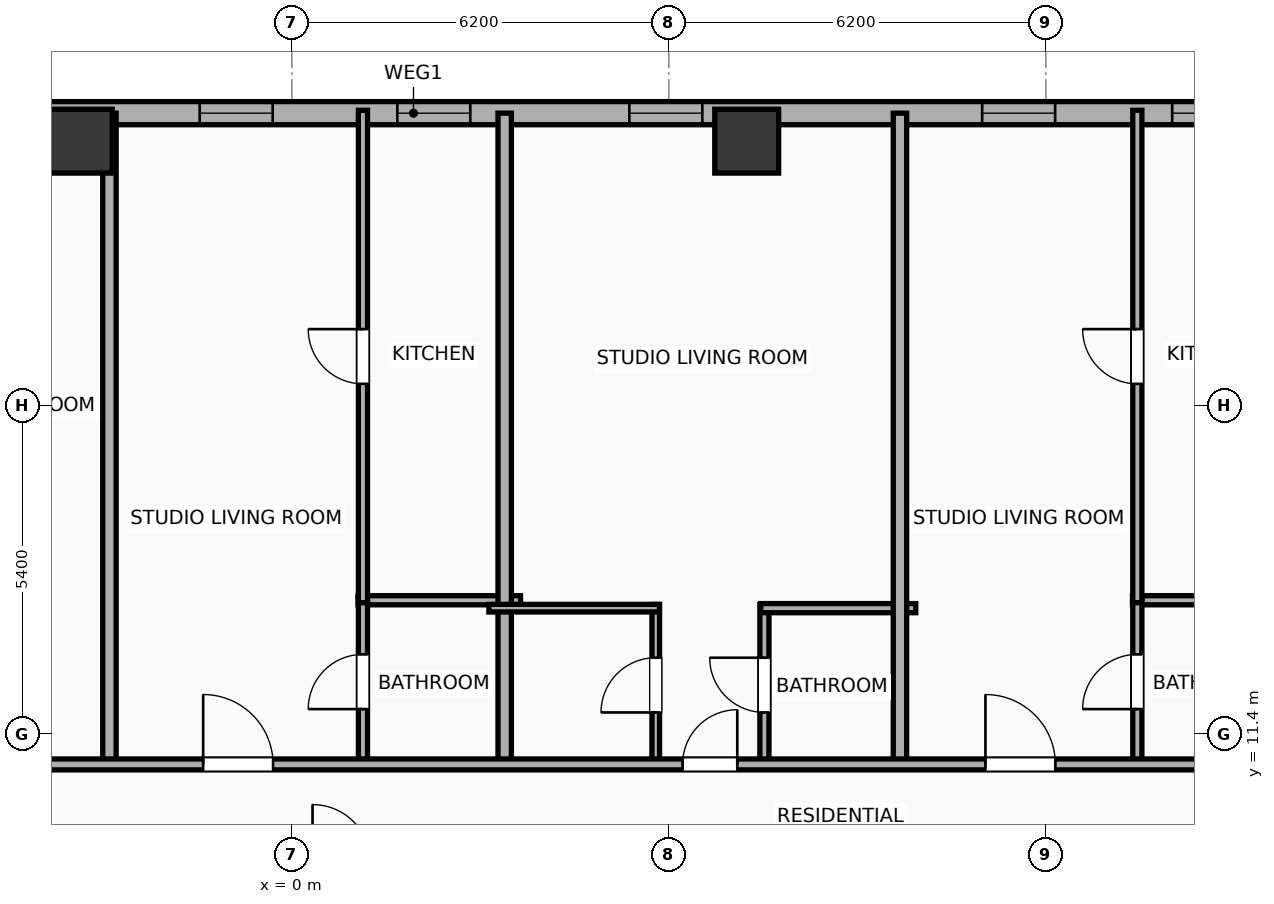
"""IFC4 building model, lengths in metres.
Left out: names, types, materials, properties, quantities, classifications, styles, units other than length and angle.
Written with IfcOpenShell. Run it as: python <this file> out.ifc"""

import sys

from ifc_helpers import new_model, si_unit, direction, frame, frame_2d, origin, origin_2d, place, context, subcontext, project, spatial, rectangle, hollow_rectangle, extrude, element, fill, save


model = new_model("IFC4")
c1 = context("Model", 3, precision=1e-05, world=origin(), true_north=direction((0.0, 1.0)))
c2 = subcontext(c1, "Body", "Model", "MODEL_VIEW")
j1 = project(units=[si_unit("LENGTHUNIT", "METRE"), si_unit("PLANEANGLEUNIT", "RADIAN")], contexts=[c1])
p1 = place(None, origin())
s1 = spatial("IfcSite", under=j1, at=p1, CompositionType="ELEMENT")
p2 = place(p1, origin())
s2 = spatial("IfcBuilding", under=s1, at=p2, CompositionType="ELEMENT")
p3 = place(p2, frame((0.0, 0.0, 89.7)))
s3 = spatial("IfcBuildingStorey", under=s2, at=p3, CompositionType="ELEMENT", Elevation=89.7)
for number, where, z_axis, x_axis in (
    (1, (7.48, 21.15, 0.0), (0.0, 0.0, 1.0), (1.0, 0.0, 0.0)),
    (2, (-3.48, 21.15, 0.0), (0.0, 0.0, 1.0), (1.0, 0.0, 0.0)),
):
    element("IfcColumn", number, at=place(p3, frame(where, z_axis=z_axis, x_axis=x_axis)), inside=s3, PredefinedType="COLUMN", context=c2, shape_type="SweptSolid", body=[
        extrude(hollow_rectangle(XDim=1.05, YDim=1.05, WallThickness=0.036, at=origin_2d()), origin(), (0.0, 0.0, 1.0), 3.9),
    ])
p4 = place(p3, frame((-25.381, 21.61, 0.0), z_axis=(0.0, 0.0, 1.0), x_axis=(1.0, 0.0, 0.0)))
e3 = element("IfcWall", 3, at=p4, inside=s3, PredefinedType="ELEMENTEDWALL", context=c2, shape_type="SweptSolid", body=[
    extrude(rectangle(XDim=54.763, YDim=0.38, at=frame_2d((27.381, 0.0))), origin(), (0.0, 0.0, 1.0), 2.54),
])
p5 = place(p4, frame((6.495, 0.0, 0.75)))
e4 = element("IfcOpeningElement", 4, at=p5, cuts=e3, PredefinedType="OPENING", context=c2, shape_type="SweptSolid", body=[
    extrude(rectangle(XDim=2.4, YDim=1.63, at=frame_2d((1.2, 0.815))), frame((0.0, 0.2, 0.0), z_axis=(0.0, -1.0, 0.0), x_axis=(1.0, 0.0, 0.0)), (0.0, 0.0, 1.0), 0.4),
])
p6 = place(p4, frame((48.367, 0.0, 0.75)))
e5 = element("IfcOpeningElement", 5, at=p6, cuts=e3, PredefinedType="OPENING", context=c2, shape_type="SweptSolid", body=[
    extrude(rectangle(XDim=2.4, YDim=1.63, at=frame_2d((1.2, 0.815))), frame((0.0, 0.2, 0.0), z_axis=(0.0, -1.0, 0.0), x_axis=(1.0, 0.0, 0.0)), (0.0, 0.0, 1.0), 0.4),
])
p7 = place(p4, frame((1.231, 0.0, 0.75)))
e6 = element("IfcOpeningElement", 6, at=p7, cuts=e3, PredefinedType="OPENING", context=c2, shape_type="SweptSolid", body=[
    extrude(rectangle(XDim=1.2, YDim=1.63, at=frame_2d((0.6, 0.815))), frame((0.0, 0.2, 0.0), z_axis=(0.0, -1.0, 0.0), x_axis=(1.0, 0.0, 0.0)), (0.0, 0.0, 1.0), 0.4),
])
p8 = place(p4, frame((3.772, 0.0, 0.75)))
e7 = element("IfcOpeningElement", 7, at=p8, cuts=e3, PredefinedType="OPENING", context=c2, shape_type="SweptSolid", body=[
    extrude(rectangle(XDim=1.2, YDim=1.63, at=frame_2d((0.6, 0.815))), frame((0.0, 0.2, 0.0), z_axis=(0.0, -1.0, 0.0), x_axis=(1.0, 0.0, 0.0)), (0.0, 0.0, 1.0), 0.4),
])
p9 = place(p4, frame((12.031, 0.0, 0.75)))
e8 = element("IfcOpeningElement", 8, at=p9, cuts=e3, PredefinedType="OPENING", context=c2, shape_type="SweptSolid", body=[
    extrude(rectangle(XDim=1.2, YDim=1.63, at=frame_2d((0.6, 0.815))), frame((0.0, 0.2, 0.0), z_axis=(0.0, -1.0, 0.0), x_axis=(1.0, 0.0, 0.0)), (0.0, 0.0, 1.0), 0.4),
])
p10 = place(p4, frame((19.805, 0.0, 0.75)))
e9 = element("IfcOpeningElement", 9, at=p10, cuts=e3, PredefinedType="OPENING", context=c2, shape_type="SweptSolid", body=[
    extrude(rectangle(XDim=1.2, YDim=1.63, at=frame_2d((0.6, 0.815))), frame((0.0, 0.2, 0.0), z_axis=(0.0, -1.0, 0.0), x_axis=(1.0, 0.0, 0.0)), (0.0, 0.0, 1.0), 0.4),
])
p11 = place(p4, frame((16.555, 0.0, 0.75)))
e10 = element("IfcOpeningElement", 10, at=p11, cuts=e3, PredefinedType="OPENING", context=c2, shape_type="SweptSolid", body=[
    extrude(rectangle(XDim=1.2, YDim=1.63, at=frame_2d((0.6, 0.815))), frame((0.0, 0.2, 0.0), z_axis=(0.0, -1.0, 0.0), x_axis=(1.0, 0.0, 0.0)), (0.0, 0.0, 1.0), 0.4),
])
p12 = place(p4, frame((23.866, 0.0, 0.75)))
e11 = element("IfcOpeningElement", 11, at=p12, cuts=e3, PredefinedType="OPENING", context=c2, shape_type="SweptSolid", body=[
    extrude(rectangle(XDim=1.2, YDim=1.63, at=frame_2d((0.6, 0.815))), frame((0.0, 0.2, 0.0), z_axis=(0.0, -1.0, 0.0), x_axis=(1.0, 0.0, 0.0)), (0.0, 0.0, 1.0), 0.4),
])
p13 = place(p4, frame((27.116, 0.0, 0.75)))
e12 = element("IfcOpeningElement", 12, at=p13, cuts=e3, PredefinedType="OPENING", context=c2, shape_type="SweptSolid", body=[
    extrude(rectangle(XDim=1.2, YDim=1.63, at=frame_2d((0.6, 0.815))), frame((0.0, 0.2, 0.0), z_axis=(0.0, -1.0, 0.0), x_axis=(1.0, 0.0, 0.0)), (0.0, 0.0, 1.0), 0.4),
])
p14 = place(p4, frame((30.931, 0.0, 0.75)))
e13 = element("IfcOpeningElement", 13, at=p14, cuts=e3, PredefinedType="OPENING", context=c2, shape_type="SweptSolid", body=[
    extrude(rectangle(XDim=1.2, YDim=1.63, at=frame_2d((0.6, 0.815))), frame((0.0, 0.2, 0.0), z_axis=(0.0, -1.0, 0.0), x_axis=(1.0, 0.0, 0.0)), (0.0, 0.0, 1.0), 0.4),
])
p15 = place(p4, frame((36.733, 0.0, 0.75)))
e14 = element("IfcOpeningElement", 14, at=p15, cuts=e3, PredefinedType="OPENING", context=c2, shape_type="SweptSolid", body=[
    extrude(rectangle(XDim=1.2, YDim=1.63, at=frame_2d((0.6, 0.815))), frame((0.0, 0.2, 0.0), z_axis=(0.0, -1.0, 0.0), x_axis=(1.0, 0.0, 0.0)), (0.0, 0.0, 1.0), 0.4),
])
p16 = place(p4, frame((39.858, 0.0, 0.75)))
e15 = element("IfcOpeningElement", 15, at=p16, cuts=e3, PredefinedType="OPENING", context=c2, shape_type="SweptSolid", body=[
    extrude(rectangle(XDim=1.2, YDim=1.63, at=frame_2d((0.6, 0.815))), frame((0.0, 0.2, 0.0), z_axis=(0.0, -1.0, 0.0), x_axis=(1.0, 0.0, 0.0)), (0.0, 0.0, 1.0), 0.4),
])
p17 = place(p4, frame((44.636, 0.0, 0.75)))
e16 = element("IfcOpeningElement", 16, at=p17, cuts=e3, PredefinedType="OPENING", context=c2, shape_type="SweptSolid", body=[
    extrude(rectangle(XDim=1.2, YDim=1.63, at=frame_2d((0.6, 0.815))), frame((0.0, 0.2, 0.0), z_axis=(0.0, -1.0, 0.0), x_axis=(1.0, 0.0, 0.0)), (0.0, 0.0, 1.0), 0.4),
])
p18 = place(p4, frame((51.809, 0.0, 0.75)))
e17 = element("IfcOpeningElement", 17, at=p18, cuts=e3, PredefinedType="OPENING", context=c2, shape_type="SweptSolid", body=[
    extrude(rectangle(XDim=1.2, YDim=1.63, at=frame_2d((0.6, 0.815))), frame((0.0, 0.2, 0.0), z_axis=(0.0, -1.0, 0.0), x_axis=(1.0, 0.0, 0.0)), (0.0, 0.0, 1.0), 0.4),
])
p19 = place(p3, frame((-3.0, 10.82, 0.0), z_axis=(0.0, 0.0, 1.0), x_axis=(0.0, 1.0, 0.0)))
e18 = element("IfcWall", 18, at=p19, inside=s3, PredefinedType="PARTITIONING", context=c2, shape_type="SweptSolid", body=[
    extrude(rectangle(XDim=10.79, YDim=0.22, at=frame_2d((5.395, 0.0))), origin(), (0.0, 0.0, 1.0), 2.54),
])
p20 = place(p3, frame((1.089, 13.6, 0.0), z_axis=(0.0, 0.0, 1.0), x_axis=(1.0, 0.0, 0.0)))
e19 = element("IfcWall", 19, at=p20, inside=s3, PredefinedType="PLUMBINGWALL", context=c2, shape_type="SweptSolid", body=[
    extrude(rectangle(XDim=2.671, YDim=0.15, at=frame_2d((1.335, 0.0))), origin(), (0.0, 0.0, 1.0), 3.65),
])
p21 = place(p3, frame((1.169, 10.88, 0.0), z_axis=(0.0, 0.0, 1.0), x_axis=(0.0, 1.0, 0.0)))
e20 = element("IfcWall", 20, at=p21, inside=s3, PredefinedType="PLUMBINGWALL", context=c2, shape_type="SweptSolid", body=[
    extrude(rectangle(XDim=2.76, YDim=0.15, at=frame_2d((1.38, 0.0))), origin(), (0.0, 0.0, 1.0), 3.65),
])
p22 = place(p21, frame((0.93, 0.0, 0.0)))
e21 = element("IfcOpeningElement", 21, at=p22, cuts=e20, PredefinedType="OPENING", context=c2, shape_type="SweptSolid", body=[
    extrude(rectangle(XDim=0.9, YDim=2.05, at=frame_2d((0.45, 1.025))), frame((0.0, 0.085, 0.0), z_axis=(0.0, -1.0, 0.0), x_axis=(1.0, 0.0, 0.0)), (0.0, 0.0, 1.0), 0.17),
])
p23 = place(p3, frame((1.169, 13.56, 0.0), z_axis=(0.0, 0.0, 1.0), x_axis=(0.0, 1.0, 0.0)))
e22 = element("IfcWall", 22, at=p23, inside=s3, PredefinedType="PLUMBINGWALL", context=c2, shape_type="SweptSolid", body=[
    extrude(rectangle(XDim=8.098, YDim=0.15, at=frame_2d((4.049, 0.0))), origin(), (0.0, 0.0, 1.0), 3.65),
])
p24 = place(p23, frame((3.599, 0.0, 0.0)))
e23 = element("IfcOpeningElement", 23, at=p24, cuts=e22, PredefinedType="OPENING", context=c2, shape_type="SweptSolid", body=[
    extrude(rectangle(XDim=0.9, YDim=2.05, at=frame_2d((0.45, 1.025))), frame((0.0, 0.085, 0.0), z_axis=(0.0, -1.0, 0.0), x_axis=(1.0, 0.0, 0.0)), (0.0, 0.0, 1.0), 0.17),
])
p25 = place(p3, frame((3.5, 10.82, 0.0), z_axis=(0.0, 0.0, 1.0), x_axis=(0.0, 1.0, 0.0)))
e24 = element("IfcWall", 24, at=p25, inside=s3, PredefinedType="PARTITIONING", context=c2, shape_type="SweptSolid", body=[
    extrude(rectangle(XDim=10.79, YDim=0.22, at=frame_2d((5.395, 0.0))), origin(), (0.0, 0.0, 1.0), 3.65),
])
p26 = place(p3, frame((5.984, 10.88, 0.0), z_axis=(0.0, 0.0, 1.0), x_axis=(0.0, 1.0, 0.0)))
e25 = element("IfcWall", 25, at=p26, inside=s3, PredefinedType="PARTITIONING", context=c2, shape_type="SweptSolid", body=[
    extrude(rectangle(XDim=2.65, YDim=0.125, at=frame_2d((1.325, 0.0))), origin(), (0.0, 0.0, 1.0), 2.54),
])
p27 = place(p26, frame((0.875, 0.0, 0.0)))
e26 = element("IfcOpeningElement", 26, at=p27, cuts=e25, PredefinedType="OPENING", context=c2, shape_type="SweptSolid", body=[
    extrude(rectangle(XDim=0.9, YDim=2.05, at=frame_2d((0.45, 1.025))), frame((0.0, 0.073, 0.0), z_axis=(0.0, -1.0, 0.0), x_axis=(1.0, 0.0, 0.0)), (0.0, 0.0, 1.0), 0.145),
])
p28 = place(p3, frame((7.771, 10.88, 0.0), z_axis=(0.0, 0.0, 1.0), x_axis=(0.0, 1.0, 0.0)))
e27 = element("IfcWall", 27, at=p28, inside=s3, PredefinedType="PLUMBINGWALL", context=c2, shape_type="SweptSolid", body=[
    extrude(rectangle(XDim=2.65, YDim=0.15, at=frame_2d((1.325, 0.0))), origin(), (0.0, 0.0, 1.0), 3.65),
])
p29 = place(p28, frame((0.875, 0.0, 0.0)))
e28 = element("IfcOpeningElement", 28, at=p29, cuts=e27, PredefinedType="OPENING", context=c2, shape_type="SweptSolid", body=[
    extrude(rectangle(XDim=0.9, YDim=2.05, at=frame_2d((0.45, 1.025))), frame((0.0, 0.085, 0.0), z_axis=(0.0, -1.0, 0.0), x_axis=(1.0, 0.0, 0.0)), (0.0, 0.0, 1.0), 0.17),
])
p30 = place(p3, frame((3.24, 13.47, 0.0), z_axis=(0.0, 0.0, 1.0), x_axis=(1.0, 0.0, 0.0)))
e29 = element("IfcWall", 29, at=p30, inside=s3, PredefinedType="PARTITIONING", context=c2, shape_type="SweptSolid", body=[
    extrude(rectangle(XDim=2.804, YDim=0.125, at=frame_2d((1.402, 0.0))), origin(), (0.0, 0.0, 1.0), 3.65),
])
p31 = place(p3, frame((7.711, 13.47, 0.0), z_axis=(0.0, 0.0, 1.0), x_axis=(1.0, 0.0, 0.0)))
e30 = element("IfcWall", 30, at=p31, inside=s3, PredefinedType="PLUMBINGWALL", context=c2, shape_type="SweptSolid", body=[
    extrude(rectangle(XDim=2.549, YDim=0.15, at=frame_2d((1.274, 0.0))), origin(), (0.0, 0.0, 1.0), 3.65),
])
p32 = place(p3, frame((10.0, 10.82, 0.0), z_axis=(0.0, 0.0, 1.0), x_axis=(0.0, 1.0, 0.0)))
e31 = element("IfcWall", 31, at=p32, inside=s3, PredefinedType="PARTITIONING", context=c2, shape_type="SweptSolid", body=[
    extrude(rectangle(XDim=10.79, YDim=0.22, at=frame_2d((5.395, 0.0))), origin(), (0.0, 0.0, 1.0), 3.65),
])
p33 = place(p3, frame((13.824, 13.6, 0.0), z_axis=(0.0, 0.0, 1.0), x_axis=(1.0, 0.0, 0.0)))
e32 = element("IfcWall", 32, at=p33, inside=s3, PredefinedType="PLUMBINGWALL", context=c2, shape_type="SweptSolid", body=[
    extrude(rectangle(XDim=2.686, YDim=0.15, at=frame_2d((1.343, 0.0))), origin(), (0.0, 0.0, 1.0), 3.65),
])
p34 = place(p3, frame((13.904, 10.88, 0.0), z_axis=(0.0, 0.0, 1.0), x_axis=(0.0, 1.0, 0.0)))
e33 = element("IfcWall", 33, at=p34, inside=s3, PredefinedType="PLUMBINGWALL", context=c2, shape_type="SweptSolid", body=[
    extrude(rectangle(XDim=2.76, YDim=0.15, at=frame_2d((1.38, 0.0))), origin(), (0.0, 0.0, 1.0), 3.65),
])
p35 = place(p34, frame((0.93, 0.0, 0.0)))
e34 = element("IfcOpeningElement", 34, at=p35, cuts=e33, PredefinedType="OPENING", context=c2, shape_type="SweptSolid", body=[
    extrude(rectangle(XDim=0.9, YDim=2.05, at=frame_2d((0.45, 1.025))), frame((0.0, 0.085, 0.0), z_axis=(0.0, -1.0, 0.0), x_axis=(1.0, 0.0, 0.0)), (0.0, 0.0, 1.0), 0.17),
])
p36 = place(p3, frame((13.904, 13.56, 0.0), z_axis=(0.0, 0.0, 1.0), x_axis=(0.0, 1.0, 0.0)))
e35 = element("IfcWall", 35, at=p36, inside=s3, PredefinedType="PLUMBINGWALL", context=c2, shape_type="SweptSolid", body=[
    extrude(rectangle(XDim=8.098, YDim=0.15, at=frame_2d((4.049, 0.0))), origin(), (0.0, 0.0, 1.0), 3.65),
])
p37 = place(p36, frame((3.599, 0.0, 0.0)))
e36 = element("IfcOpeningElement", 36, at=p37, cuts=e35, PredefinedType="OPENING", context=c2, shape_type="SweptSolid", body=[
    extrude(rectangle(XDim=0.9, YDim=2.05, at=frame_2d((0.45, 1.025))), frame((0.0, 0.085, 0.0), z_axis=(0.0, -1.0, 0.0), x_axis=(1.0, 0.0, 0.0)), (0.0, 0.0, 1.0), 0.17),
])
p38 = place(p3, frame((-29.21, 10.9, 0.0), z_axis=(0.0, 0.0, 1.0), x_axis=(1.0, 0.0, 0.0)))
e37 = element("IfcWall", 37, at=p38, inside=s3, PredefinedType="PARTITIONING", context=c2, shape_type="SweptSolid", body=[
    extrude(rectangle(XDim=62.42, YDim=0.18, at=frame_2d((31.21, 0.0))), origin(), (0.0, 0.0, 1.0), 3.65),
])
p39 = place(p38, frame((2.983, 0.0, 0.0)))
e38 = element("IfcOpeningElement", 38, at=p39, cuts=e37, PredefinedType="OPENING", context=c2, shape_type="SweptSolid", body=[
    extrude(rectangle(XDim=0.9, YDim=2.05, at=frame_2d((0.45, 1.025))), frame((0.0, 0.1, 0.0), z_axis=(0.0, -1.0, 0.0), x_axis=(1.0, 0.0, 0.0)), (0.0, 0.0, 1.0), 0.2),
])
p40 = place(p38, frame((9.618, 0.0, 0.0)))
e39 = element("IfcOpeningElement", 39, at=p40, cuts=e37, PredefinedType="OPENING", context=c2, shape_type="SweptSolid", body=[
    extrude(rectangle(XDim=0.9, YDim=2.05, at=frame_2d((0.45, 1.025))), frame((0.0, 0.1, 0.0), z_axis=(0.0, -1.0, 0.0), x_axis=(1.0, 0.0, 0.0)), (0.0, 0.0, 1.0), 0.2),
])
p41 = place(p38, frame((16.135, 0.0, 0.0)))
e40 = element("IfcOpeningElement", 40, at=p41, cuts=e37, PredefinedType="OPENING", context=c2, shape_type="SweptSolid", body=[
    extrude(rectangle(XDim=0.9, YDim=2.05, at=frame_2d((0.45, 1.025))), frame((0.0, 0.1, 0.0), z_axis=(0.0, -1.0, 0.0), x_axis=(1.0, 0.0, 0.0)), (0.0, 0.0, 1.0), 0.2),
])
p42 = place(p38, frame((23.632, 0.0, 0.0)))
e41 = element("IfcOpeningElement", 41, at=p42, cuts=e37, PredefinedType="OPENING", context=c2, shape_type="SweptSolid", body=[
    extrude(rectangle(XDim=1.15, YDim=2.05, at=frame_2d((0.575, 1.025))), frame((0.0, 0.1, 0.0), z_axis=(0.0, -1.0, 0.0), x_axis=(1.0, 0.0, 0.0)), (0.0, 0.0, 1.0), 0.2),
])
p43 = place(p38, frame((27.751, 0.0, 0.0)))
e42 = element("IfcOpeningElement", 42, at=p43, cuts=e37, PredefinedType="OPENING", context=c2, shape_type="SweptSolid", body=[
    extrude(rectangle(XDim=1.15, YDim=2.05, at=frame_2d((0.575, 1.025))), frame((0.0, 0.1, 0.0), z_axis=(0.0, -1.0, 0.0), x_axis=(1.0, 0.0, 0.0)), (0.0, 0.0, 1.0), 0.2),
])
p44 = place(p38, frame((35.635, 0.0, 0.0)))
e43 = element("IfcOpeningElement", 43, at=p44, cuts=e37, PredefinedType="OPENING", context=c2, shape_type="SweptSolid", body=[
    extrude(rectangle(XDim=0.9, YDim=2.05, at=frame_2d((0.45, 1.025))), frame((0.0, 0.1, 0.0), z_axis=(0.0, -1.0, 0.0), x_axis=(1.0, 0.0, 0.0)), (0.0, 0.0, 1.0), 0.2),
])
p45 = place(p38, frame((40.616, 0.0, 0.0)))
e44 = element("IfcOpeningElement", 44, at=p45, cuts=e37, PredefinedType="OPENING", context=c2, shape_type="SweptSolid", body=[
    extrude(rectangle(XDim=1.15, YDim=2.05, at=frame_2d((0.575, 1.025))), frame((0.0, 0.1, 0.0), z_axis=(0.0, -1.0, 0.0), x_axis=(1.0, 0.0, 0.0)), (0.0, 0.0, 1.0), 0.2),
])
p46 = place(p38, frame((48.256, 0.0, 0.0)))
e45 = element("IfcOpeningElement", 45, at=p46, cuts=e37, PredefinedType="OPENING", context=c2, shape_type="SweptSolid", body=[
    extrude(rectangle(XDim=0.9, YDim=2.05, at=frame_2d((0.45, 1.025))), frame((0.0, 0.1, 0.0), z_axis=(0.0, -1.0, 0.0), x_axis=(1.0, 0.0, 0.0)), (0.0, 0.0, 1.0), 0.2),
])
p47 = place(p38, frame((57.032, 0.0, 0.0)))
e46 = element("IfcOpeningElement", 46, at=p47, cuts=e37, PredefinedType="OPENING", context=c2, shape_type="SweptSolid", body=[
    extrude(rectangle(XDim=1.15, YDim=2.05, at=frame_2d((0.575, 1.025))), frame((0.0, 0.1, 0.0), z_axis=(0.0, -1.0, 0.0), x_axis=(1.0, 0.0, 0.0)), (0.0, 0.0, 1.0), 0.2),
])
p48 = place(p12, origin())
e47 = element("IfcWindow", 47, at=p48, inside=s3, PartitioningType="SINGLE_PANEL", PredefinedType="WINDOW", context=c2, shape_type="SweptSolid", body=[
    extrude(rectangle(XDim=1.2, YDim=1.63, at=frame_2d((0.6, 0.815))), frame((0.0, 0.03, 0.0), z_axis=(0.0, -1.0, 0.0), x_axis=(1.0, 0.0, 0.0)), (0.0, 0.0, 1.0), 0.06),
])
fill(e11, e47)
p49 = place(p13, origin())
e48 = element("IfcWindow", 48, at=p49, inside=s3, PartitioningType="SINGLE_PANEL", PredefinedType="WINDOW", context=c2, shape_type="SweptSolid", body=[
    extrude(rectangle(XDim=1.2, YDim=1.63, at=frame_2d((0.6, 0.815))), frame((0.0, 0.03, 0.0), z_axis=(0.0, -1.0, 0.0), x_axis=(1.0, 0.0, 0.0)), (0.0, 0.0, 1.0), 0.06),
])
fill(e12, e48)
p50 = place(p14, origin())
e49 = element("IfcWindow", 49, at=p50, inside=s3, PartitioningType="SINGLE_PANEL", PredefinedType="WINDOW", context=c2, shape_type="SweptSolid", body=[
    extrude(rectangle(XDim=1.2, YDim=1.63, at=frame_2d((0.6, 0.815))), frame((0.0, 0.03, 0.0), z_axis=(0.0, -1.0, 0.0), x_axis=(1.0, 0.0, 0.0)), (0.0, 0.0, 1.0), 0.06),
])
fill(e13, e49)
p51 = place(p15, origin())
e50 = element("IfcWindow", 50, at=p51, inside=s3, PartitioningType="SINGLE_PANEL", PredefinedType="WINDOW", context=c2, shape_type="SweptSolid", body=[
    extrude(rectangle(XDim=1.2, YDim=1.63, at=frame_2d((0.6, 0.815))), frame((0.0, 0.03, 0.0), z_axis=(0.0, -1.0, 0.0), x_axis=(1.0, 0.0, 0.0)), (0.0, 0.0, 1.0), 0.06),
])
fill(e14, e50)
p52 = place(p16, origin())
e51 = element("IfcWindow", 51, at=p52, inside=s3, PartitioningType="SINGLE_PANEL", PredefinedType="WINDOW", context=c2, shape_type="SweptSolid", body=[
    extrude(rectangle(XDim=1.2, YDim=1.63, at=frame_2d((0.6, 0.815))), frame((0.0, 0.03, 0.0), z_axis=(0.0, -1.0, 0.0), x_axis=(1.0, 0.0, 0.0)), (0.0, 0.0, 1.0), 0.06),
])
fill(e15, e51)
p53 = place(p22, origin())
e52 = element("IfcDoor", 52, at=p53, inside=s3, OperationType="SINGLE_SWING_LEFT", PredefinedType="DOOR", context=c2, shape_type="SweptSolid", body=[
    extrude(rectangle(XDim=0.9, YDim=2.05, at=frame_2d((0.45, 1.025))), frame((0.0, 0.025, 0.0), z_axis=(0.0, -1.0, 0.0), x_axis=(1.0, 0.0, 0.0)), (0.0, 0.0, 1.0), 0.05),
])
fill(e21, e52)
p54 = place(p24, origin())
e53 = element("IfcDoor", 53, at=p54, inside=s3, OperationType="SINGLE_SWING_RIGHT", PredefinedType="DOOR", context=c2, shape_type="SweptSolid", body=[
    extrude(rectangle(XDim=0.9, YDim=2.05, at=frame_2d((0.45, 1.025))), frame((0.0, 0.025, 0.0), z_axis=(0.0, -1.0, 0.0), x_axis=(1.0, 0.0, 0.0)), (0.0, 0.0, 1.0), 0.05),
])
fill(e23, e53)
p55 = place(p27, origin())
e54 = element("IfcDoor", 54, at=p55, inside=s3, OperationType="SINGLE_SWING_LEFT", PredefinedType="DOOR", context=c2, shape_type="SweptSolid", body=[
    extrude(rectangle(XDim=0.9, YDim=2.05, at=frame_2d((0.45, 1.025))), frame((0.0, 0.025, 0.0), z_axis=(0.0, -1.0, 0.0), x_axis=(1.0, 0.0, 0.0)), (0.0, 0.0, 1.0), 0.05),
])
fill(e26, e54)
p56 = place(p29, origin())
e55 = element("IfcDoor", 55, at=p56, inside=s3, OperationType="SINGLE_SWING_RIGHT", PredefinedType="DOOR", context=c2, shape_type="SweptSolid", body=[
    extrude(rectangle(XDim=0.9, YDim=2.05, at=frame_2d((0.45, 1.025))), frame((0.0, 0.025, 0.0), z_axis=(0.0, -1.0, 0.0), x_axis=(1.0, 0.0, 0.0)), (0.0, 0.0, 1.0), 0.05),
])
fill(e28, e55)
p57 = place(p35, origin())
e56 = element("IfcDoor", 56, at=p57, inside=s3, OperationType="SINGLE_SWING_LEFT", PredefinedType="DOOR", context=c2, shape_type="SweptSolid", body=[
    extrude(rectangle(XDim=0.9, YDim=2.05, at=frame_2d((0.45, 1.025))), frame((0.0, 0.025, 0.0), z_axis=(0.0, -1.0, 0.0), x_axis=(1.0, 0.0, 0.0)), (0.0, 0.0, 1.0), 0.05),
])
fill(e34, e56)
p58 = place(p37, origin())
e57 = element("IfcDoor", 57, at=p58, inside=s3, OperationType="SINGLE_SWING_RIGHT", PredefinedType="DOOR", context=c2, shape_type="SweptSolid", body=[
    extrude(rectangle(XDim=0.9, YDim=2.05, at=frame_2d((0.45, 1.025))), frame((0.0, 0.025, 0.0), z_axis=(0.0, -1.0, 0.0), x_axis=(1.0, 0.0, 0.0)), (0.0, 0.0, 1.0), 0.05),
])
fill(e36, e57)
p59 = place(p43, origin())
e58 = element("IfcDoor", 58, at=p59, inside=s3, OperationType="SINGLE_SWING_LEFT", PredefinedType="DOOR", context=c2, shape_type="SweptSolid", body=[
    extrude(rectangle(XDim=1.15, YDim=2.05, at=frame_2d((0.575, 1.025))), frame((0.0, 0.025, 0.0), z_axis=(0.0, -1.0, 0.0), x_axis=(1.0, 0.0, 0.0)), (0.0, 0.0, 1.0), 0.05),
])
fill(e42, e58)
p60 = place(p44, origin())
e59 = element("IfcDoor", 59, at=p60, inside=s3, OperationType="SINGLE_SWING_RIGHT", PredefinedType="DOOR", context=c2, shape_type="SweptSolid", body=[
    extrude(rectangle(XDim=0.9, YDim=2.05, at=frame_2d((0.45, 1.025))), frame((0.0, 0.025, 0.0), z_axis=(0.0, -1.0, 0.0), x_axis=(1.0, 0.0, 0.0)), (0.0, 0.0, 1.0), 0.05),
])
fill(e43, e59)
p61 = place(p45, origin())
e60 = element("IfcDoor", 60, at=p61, inside=s3, OperationType="SINGLE_SWING_LEFT", PredefinedType="DOOR", context=c2, shape_type="SweptSolid", body=[
    extrude(rectangle(XDim=1.15, YDim=2.05, at=frame_2d((0.575, 1.025))), frame((0.0, 0.025, 0.0), z_axis=(0.0, -1.0, 0.0), x_axis=(1.0, 0.0, 0.0)), (0.0, 0.0, 1.0), 0.05),
])
fill(e44, e60)
save(model, sys.argv[1])
